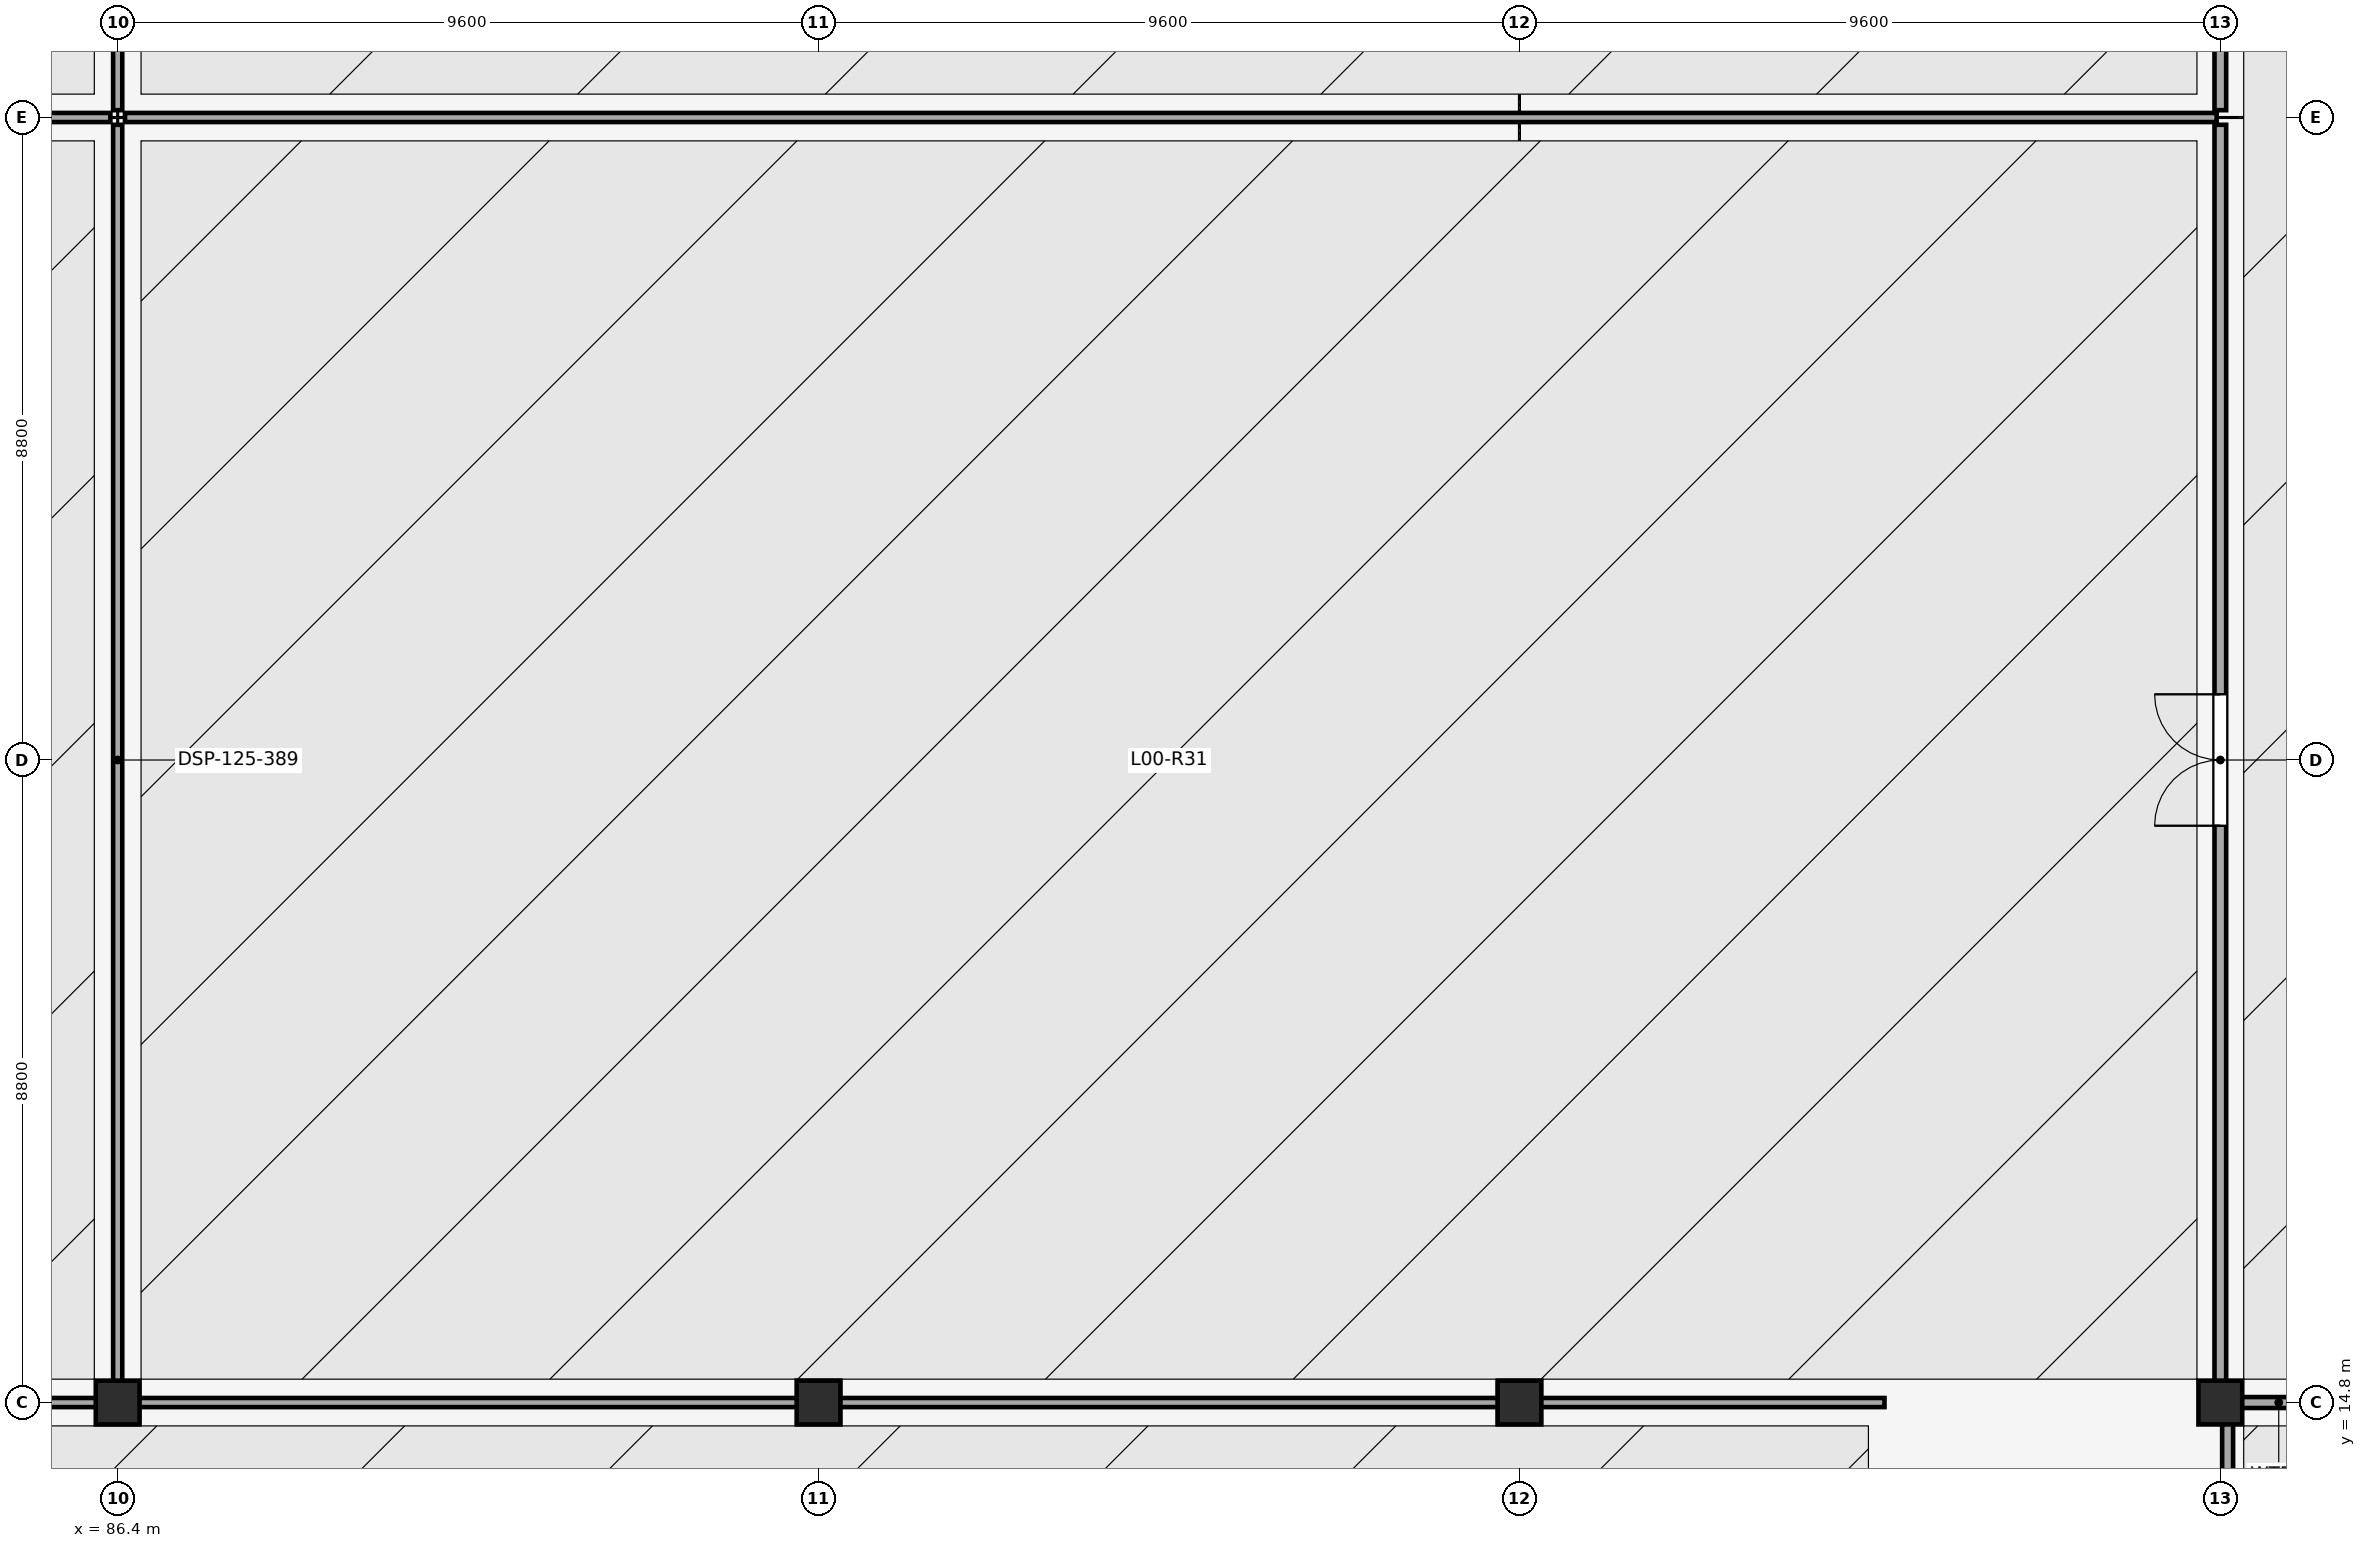
"""IFC4 building model, lengths in metres.
Left out: names, types, materials, properties, quantities, classifications, styles, units other than length and angle.
Written with IfcOpenShell. Run it as: python <this file> out.ifc"""

import sys

from ifc_helpers import new_model, si_unit, direction, frame, frame_2d, origin, origin_2d, place, context, subcontext, project, spatial, rectangle, extrude, element, fill, save


model = new_model("IFC4")
c1 = context("Model", 3, precision=1e-05, world=origin(), true_north=direction((0.0, 1.0)))
c2 = subcontext(c1, "Body", "Model", "MODEL_VIEW")
j1 = project(units=[si_unit("LENGTHUNIT", "METRE"), si_unit("PLANEANGLEUNIT", "RADIAN")], contexts=[c1])
p1 = place(None, origin())
s1 = spatial("IfcSite", under=j1, at=p1, CompositionType="ELEMENT")
p2 = place(p1, origin())
s2 = spatial("IfcBuilding", under=s1, at=p2, CompositionType="ELEMENT")
p3 = place(p2, origin())
s3 = spatial("IfcBuildingStorey", under=s2, at=p3, CompositionType="ELEMENT", Elevation=0.0)
for number, where, z_axis, x_axis in (
    (1, (86.4, 14.8, 0.0), (0.0, 0.0, 1.0), (1.0, 0.0, 0.0)),
    (2, (96.0, 14.8, 0.0), (0.0, 0.0, 1.0), (1.0, 0.0, 0.0)),
    (3, (105.6, 14.8, 0.0), (0.0, 0.0, 1.0), (1.0, 0.0, 0.0)),
    (4, (115.2, 14.8, 0.0), (0.0, 0.0, 1.0), (1.0, 0.0, 0.0)),
):
    element("IfcColumn", number, at=place(p3, frame(where, z_axis=z_axis, x_axis=x_axis)), inside=s3, PredefinedType="COLUMN", context=c2, shape_type="SweptSolid", body=[
        extrude(rectangle(XDim=0.6, YDim=0.6, at=origin_2d()), origin(), (0.0, 0.0, 1.0), 4.8),
    ])
p4 = place(p3, frame((86.4, 14.9, 0.0), z_axis=(0.0, 0.0, 1.0), x_axis=(0.0, 1.0, 0.0)))
e5 = element("IfcWall", 5, at=p4, inside=s3, PredefinedType="PARTITIONING", context=c2, shape_type="SweptSolid", body=[
    extrude(rectangle(XDim=17.4, YDim=0.125, at=frame_2d((8.7, 0.0))), origin(), (0.0, 0.0, 1.0), 4.42),
])
p5 = place(p3, frame((57.7, 32.4, 0.0), z_axis=(0.0, 0.0, 1.0), x_axis=(1.0, 0.0, 0.0)))
e6 = element("IfcWall", 6, at=p5, inside=s3, PredefinedType="PARTITIONING", context=c2, shape_type="SweptSolid", body=[
    extrude(rectangle(XDim=28.6, YDim=0.125, at=frame_2d((14.3, 0.0))), origin(), (0.0, 0.0, 1.0), 4.42),
])
p6 = place(p3, frame((62.2, 14.8, 0.0), z_axis=(0.0, 0.0, 1.0), x_axis=(1.0, 0.0, 0.0)))
e7 = element("IfcWall", 7, at=p6, inside=s3, PredefinedType="PARTITIONING", context=c2, shape_type="SweptSolid", body=[
    extrude(rectangle(XDim=24.1, YDim=0.125, at=frame_2d((12.05, 0.0))), origin(), (0.0, 0.0, 1.0), 3.925),
])
p7 = place(p3, frame((86.5, 32.4, 0.0), z_axis=(0.0, 0.0, 1.0), x_axis=(1.0, 0.0, 0.0)))
e8 = element("IfcWall", 8, at=p7, inside=s3, PredefinedType="PARTITIONING", context=c2, shape_type="SweptSolid", body=[
    extrude(rectangle(XDim=28.65, YDim=0.125, at=frame_2d((14.325, 0.0))), origin(), (0.0, 0.0, 1.0), 4.42),
])
p8 = place(p3, frame((86.5, 14.8, 0.0), z_axis=(0.0, 0.0, 1.0), x_axis=(1.0, 0.0, 0.0)))
e9 = element("IfcWall", 9, at=p8, inside=s3, PredefinedType="PARTITIONING", context=c2, shape_type="SweptSolid", body=[
    extrude(rectangle(XDim=24.1, YDim=0.125, at=frame_2d((12.05, 0.0))), origin(), (0.0, 0.0, 1.0), 3.925),
])
p9 = place(p3, frame((115.2, 14.9, 0.0), z_axis=(0.0, 0.0, 1.0), x_axis=(0.0, 1.0, 0.0)))
e10 = element("IfcWall", 10, at=p9, inside=s3, PredefinedType="PARTITIONING", context=c2, shape_type="SweptSolid", body=[
    extrude(rectangle(XDim=17.4, YDim=0.16, at=frame_2d((8.7, 0.0))), origin(), (0.0, 0.0, 1.0), 4.42),
])
p10 = place(p9, frame((7.8, 0.0, 0.0)))
e11 = element("IfcOpeningElement", 11, at=p10, cuts=e10, PredefinedType="OPENING", context=c2, shape_type="SweptSolid", body=[
    extrude(rectangle(XDim=1.8, YDim=2.15, at=frame_2d((0.9, 1.075))), frame((0.0, 0.09, 0.0), z_axis=(0.0, -1.0, 0.0), x_axis=(1.0, 0.0, 0.0)), (0.0, 0.0, 1.0), 0.18),
])
p11 = place(p3, frame((86.4, 32.5, 0.0), z_axis=(0.0, 0.0, 1.0), x_axis=(0.0, 1.0, 0.0)))
e12 = element("IfcWall", 12, at=p11, inside=s3, PredefinedType="PARTITIONING", context=c2, shape_type="SweptSolid", body=[
    extrude(rectangle(XDim=17.45, YDim=0.125, at=frame_2d((8.725, 0.0))), origin(), (0.0, 0.0, 1.0), 4.42),
])
p12 = place(p3, frame((115.2, 32.5, 0.0), z_axis=(0.0, 0.0, 1.0), x_axis=(0.0, 1.0, 0.0)))
e13 = element("IfcWall", 13, at=p12, inside=s3, PredefinedType="PARTITIONING", context=c2, shape_type="SweptSolid", body=[
    extrude(rectangle(XDim=17.45, YDim=0.16, at=frame_2d((8.725, 0.0))), origin(), (0.0, 0.0, 1.0), 4.42),
])
p13 = place(p12, frame((7.825, 0.0, 0.0)))
e14 = element("IfcOpeningElement", 14, at=p13, cuts=e13, PredefinedType="OPENING", context=c2, shape_type="SweptSolid", body=[
    extrude(rectangle(XDim=1.8, YDim=2.15, at=frame_2d((0.9, 1.075))), frame((0.0, 0.09, 0.0), z_axis=(0.0, -1.0, 0.0), x_axis=(1.0, 0.0, 0.0)), (0.0, 0.0, 1.0), 0.18),
])
p14 = place(p3, frame((115.15, 14.8, 0.0), z_axis=(0.0, 0.0, 1.0), x_axis=(1.0, 0.0, 0.0)))
e15 = element("IfcWall", 15, at=p14, inside=s3, PredefinedType="PARTITIONING", context=c2, shape_type="SweptSolid", body=[
    extrude(rectangle(XDim=4.65, YDim=0.15, at=frame_2d((2.325, 0.0))), origin(), (0.0, 0.0, 1.0), 3.835),
])
p15 = place(p14, frame((1.85, 0.0, 0.0)))
e16 = element("IfcOpeningElement", 16, at=p15, cuts=e15, PredefinedType="OPENING", context=c2, shape_type="SweptSolid", body=[
    extrude(rectangle(XDim=0.95, YDim=2.15, at=frame_2d((0.475, 1.075))), frame((0.0, 0.085, 0.0), z_axis=(0.0, -1.0, 0.0), x_axis=(1.0, 0.0, 0.0)), (0.0, 0.0, 1.0), 0.17),
])
p16 = place(p3, frame((115.3, 10.84, 0.0), z_axis=(0.0, 0.0, 1.0), x_axis=(0.0, 1.0, 0.0)))
e17 = element("IfcWall", 17, at=p16, inside=s3, PredefinedType="PARTITIONING", context=c2, shape_type="SweptSolid", body=[
    extrude(rectangle(XDim=3.72, YDim=0.15, at=frame_2d((1.86, 0.0))), origin(), (0.0, 0.0, 1.0), 4.067),
])
p17 = place(p10, origin())
e18 = element("IfcDoor", 18, at=p17, inside=s3, OperationType="DOUBLE_DOOR_SINGLE_SWING", PredefinedType="DOOR", context=c2, shape_type="SweptSolid", body=[
    extrude(rectangle(XDim=1.8, YDim=2.15, at=frame_2d((0.9, 1.075))), frame((0.0, 0.025, 0.0), z_axis=(0.0, -1.0, 0.0), x_axis=(1.0, 0.0, 0.0)), (0.0, 0.0, 1.0), 0.05),
])
fill(e11, e18)
save(model, sys.argv[1])
